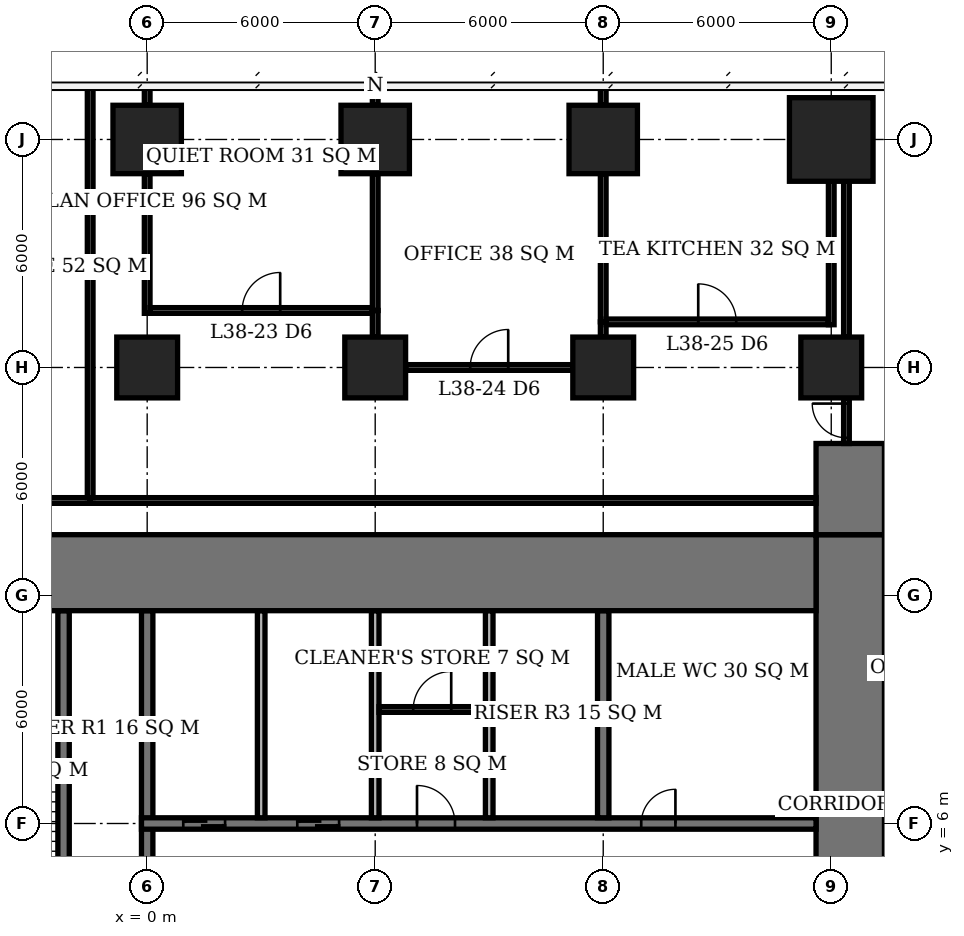
"""IFC4 building model, lengths in metres.
Left out: names, types, materials, properties, quantities, classifications, styles, units other than length and angle.
Written with IfcOpenShell. Run it as: python <this file> out.ifc"""

import sys

from ifc_helpers import new_model, si_unit, direction, frame, frame_2d, origin, origin_2d, place, context, subcontext, project, spatial, rectangle, extrude, element, fill, save


model = new_model("IFC4")
c1 = context("Model", 3, precision=1e-05, world=origin(), true_north=direction((0.0, 1.0)))
c2 = subcontext(c1, "Body", "Model", "MODEL_VIEW")
j1 = project(units=[si_unit("LENGTHUNIT", "METRE"), si_unit("PLANEANGLEUNIT", "RADIAN")], contexts=[c1])
p1 = place(None, origin())
s1 = spatial("IfcSite", under=j1, at=p1, CompositionType="ELEMENT")
p2 = place(p1, origin())
s2 = spatial("IfcBuilding", under=s1, at=p2, CompositionType="ELEMENT")
p3 = place(p2, frame((0.0, 0.0, 156.2)))
s3 = spatial("IfcBuildingStorey", under=s2, at=p3, CompositionType="ELEMENT", Elevation=156.2)
p4 = place(p3, frame((0.0, 18.0, 0.0), z_axis=(0.0, 0.0, 1.0), x_axis=(1.0, 0.0, 0.0)))
e1 = element("IfcColumn", 1, at=p4, inside=s3, PredefinedType="COLUMN", context=c2, shape_type="SweptSolid", body=[
    extrude(rectangle(XDim=1.6, YDim=1.6, at=origin_2d()), origin(), (0.0, 0.0, 1.0), 3.9),
])
p5 = place(p3, frame((0.0, 24.0, 0.0), z_axis=(0.0, 0.0, 1.0), x_axis=(1.0, 0.0, 0.0)))
e2 = element("IfcColumn", 2, at=p5, inside=s3, PredefinedType="COLUMN", context=c2, shape_type="SweptSolid", body=[
    extrude(rectangle(XDim=1.8, YDim=1.8, at=origin_2d()), origin(), (0.0, 0.0, 1.0), 3.9),
])
p6 = place(p3, frame((6.0, 18.0, 0.0), z_axis=(0.0, 0.0, 1.0), x_axis=(1.0, 0.0, 0.0)))
e3 = element("IfcColumn", 3, at=p6, inside=s3, PredefinedType="COLUMN", context=c2, shape_type="SweptSolid", body=[
    extrude(rectangle(XDim=1.6, YDim=1.6, at=origin_2d()), origin(), (0.0, 0.0, 1.0), 3.9),
])
p7 = place(p3, frame((6.0, 24.0, 0.0), z_axis=(0.0, 0.0, 1.0), x_axis=(1.0, 0.0, 0.0)))
e4 = element("IfcColumn", 4, at=p7, inside=s3, PredefinedType="COLUMN", context=c2, shape_type="SweptSolid", body=[
    extrude(rectangle(XDim=1.8, YDim=1.8, at=origin_2d()), origin(), (0.0, 0.0, 1.0), 3.9),
])
p8 = place(p3, frame((12.0, 18.0, 0.0), z_axis=(0.0, 0.0, 1.0), x_axis=(1.0, 0.0, 0.0)))
e5 = element("IfcColumn", 5, at=p8, inside=s3, PredefinedType="COLUMN", context=c2, shape_type="SweptSolid", body=[
    extrude(rectangle(XDim=1.6, YDim=1.6, at=origin_2d()), origin(), (0.0, 0.0, 1.0), 3.9),
])
p9 = place(p3, frame((12.0, 24.0, 0.0), z_axis=(0.0, 0.0, 1.0), x_axis=(1.0, 0.0, 0.0)))
e6 = element("IfcColumn", 6, at=p9, inside=s3, PredefinedType="COLUMN", context=c2, shape_type="SweptSolid", body=[
    extrude(rectangle(XDim=1.8, YDim=1.8, at=origin_2d()), origin(), (0.0, 0.0, 1.0), 3.9),
])
p10 = place(p3, frame((18.0, 18.0, 0.0), z_axis=(0.0, 0.0, 1.0), x_axis=(1.0, 0.0, 0.0)))
e7 = element("IfcColumn", 7, at=p10, inside=s3, PredefinedType="COLUMN", context=c2, shape_type="SweptSolid", body=[
    extrude(rectangle(XDim=1.6, YDim=1.6, at=origin_2d()), origin(), (0.0, 0.0, 1.0), 3.9),
])
p11 = place(p3, frame((18.0, 24.0, 0.0), z_axis=(0.0, 0.0, 1.0), x_axis=(1.0, 0.0, 0.0)))
e8 = element("IfcColumn", 8, at=p11, inside=s3, PredefinedType="COLUMN", context=c2, shape_type="SweptSolid", body=[
    extrude(rectangle(XDim=2.2, YDim=2.2, at=origin_2d()), origin(), (0.0, 0.0, 1.0), 3.9),
])
p12 = place(p3, frame((-5.6, 12.6, 0.0), z_axis=(0.0, 0.0, 1.0), x_axis=(1.0, 0.0, 0.0)))
e9 = element("IfcWall", 9, at=p12, inside=s3, PredefinedType="SHEAR", context=c2, shape_type="SweptSolid", body=[
    extrude(rectangle(XDim=23.2, YDim=2.0, at=frame_2d((11.6, 0.0))), origin(), (0.0, 0.0, 1.0), 3.9),
])
p13 = place(p3, frame((18.5, -7.6, 0.0), z_axis=(0.0, 0.0, 1.0), x_axis=(0.0, 1.0, 0.0)))
e10 = element("IfcWall", 10, at=p13, inside=s3, PredefinedType="SHEAR", context=c2, shape_type="SweptSolid", body=[
    extrude(rectangle(XDim=21.2, YDim=1.8, at=frame_2d((10.6, 0.0))), origin(), (0.0, 0.0, 1.0), 3.9),
])
p14 = place(p13, frame((9.2, 0.0, 0.0)))
e11 = element("IfcOpeningElement", 11, at=p14, cuts=e10, PredefinedType="OPENING", context=c2, shape_type="SweptSolid", body=[
    extrude(rectangle(XDim=1.8, YDim=2.4, at=frame_2d((0.9, 1.2))), frame((0.0, 0.91, 0.0), z_axis=(0.0, -1.0, 0.0), x_axis=(1.0, 0.0, 0.0)), (0.0, 0.0, 1.0), 1.82),
])
p15 = place(p3, frame((18.5, 13.6, 0.0), z_axis=(0.0, 0.0, 1.0), x_axis=(0.0, 1.0, 0.0)))
e12 = element("IfcWall", 12, at=p15, inside=s3, PredefinedType="SHEAR", context=c2, shape_type="SweptSolid", body=[
    extrude(rectangle(XDim=2.4, YDim=1.8, at=frame_2d((1.2, 0.0))), origin(), (0.0, 0.0, 1.0), 3.9),
])
p16 = place(p3, frame((-0.15, 6.0, 0.0), z_axis=(0.0, 0.0, 1.0), x_axis=(1.0, 0.0, 0.0)))
e13 = element("IfcWall", 13, at=p16, inside=s3, PredefinedType="SHEAR", context=c2, shape_type="SweptSolid", body=[
    extrude(rectangle(XDim=17.75, YDim=0.3, at=frame_2d((8.875, 0.0))), origin(), (0.0, 0.0, 1.0), 3.9),
])
p17 = place(p16, frame((13.15, 0.0, 0.0)))
e14 = element("IfcOpeningElement", 14, at=p17, cuts=e13, PredefinedType="OPENING", context=c2, shape_type="SweptSolid", body=[
    extrude(rectangle(XDim=0.9, YDim=2.1, at=frame_2d((0.45, 1.05))), frame((0.0, 0.16, 0.0), z_axis=(0.0, -1.0, 0.0), x_axis=(1.0, 0.0, 0.0)), (0.0, 0.0, 1.0), 0.32),
])
p18 = place(p16, frame((7.25, 0.0, 0.0)))
e15 = element("IfcOpeningElement", 15, at=p18, cuts=e13, PredefinedType="OPENING", context=c2, shape_type="SweptSolid", body=[
    extrude(rectangle(XDim=1.0, YDim=2.1, at=frame_2d((0.5, 1.05))), frame((0.0, 0.16, 0.0), z_axis=(0.0, -1.0, 0.0), x_axis=(1.0, 0.0, 0.0)), (0.0, 0.0, 1.0), 0.32),
])
p19 = place(p16, frame((1.1, 0.0, 0.0)))
e16 = element("IfcOpeningElement", 16, at=p19, cuts=e13, PredefinedType="OPENING", context=c2, shape_type="SweptSolid", body=[
    extrude(rectangle(XDim=1.1, YDim=2.1, at=frame_2d((0.55, 1.05))), frame((0.0, 0.16, 0.0), z_axis=(0.0, -1.0, 0.0), x_axis=(1.0, 0.0, 0.0)), (0.0, 0.0, 1.0), 0.32),
])
p20 = place(p16, frame((4.1, 0.0, 0.0)))
e17 = element("IfcOpeningElement", 17, at=p20, cuts=e13, PredefinedType="OPENING", context=c2, shape_type="SweptSolid", body=[
    extrude(rectangle(XDim=1.1, YDim=2.1, at=frame_2d((0.55, 1.05))), frame((0.0, 0.16, 0.0), z_axis=(0.0, -1.0, 0.0), x_axis=(1.0, 0.0, 0.0)), (0.0, 0.0, 1.0), 0.32),
])
p21 = place(p3, frame((0.0, 3.15, 0.0), z_axis=(0.0, 0.0, 1.0), x_axis=(0.0, 1.0, 0.0)))
e18 = element("IfcWall", 18, at=p21, inside=s3, PredefinedType="SHEAR", context=c2, shape_type="SweptSolid", body=[
    extrude(rectangle(XDim=8.45, YDim=0.3, at=frame_2d((4.225, 0.0))), origin(), (0.0, 0.0, 1.0), 3.9),
])
p22 = place(p3, frame((12.0, 6.15, 0.0), z_axis=(0.0, 0.0, 1.0), x_axis=(0.0, 1.0, 0.0)))
e19 = element("IfcWall", 19, at=p22, inside=s3, PredefinedType="SHEAR", context=c2, shape_type="SweptSolid", body=[
    extrude(rectangle(XDim=5.45, YDim=0.3, at=frame_2d((2.725, 0.0))), origin(), (0.0, 0.0, 1.0), 3.9),
])
p23 = place(p3, frame((-2.2, 3.15, 0.0), z_axis=(0.0, 0.0, 1.0), x_axis=(0.0, 1.0, 0.0)))
e20 = element("IfcWall", 20, at=p23, inside=s3, PredefinedType="SHEAR", context=c2, shape_type="SweptSolid", body=[
    extrude(rectangle(XDim=8.45, YDim=0.3, at=frame_2d((4.225, 0.0))), origin(), (0.0, 0.0, 1.0), 3.9),
])
for number, where, z_axis, x_axis in (
    (21, (3.0, 6.15, 0.0), (0.0, 0.0, 1.0), (0.0, 1.0, 0.0)),
    (22, (6.0, 6.15, 0.0), (0.0, 0.0, 1.0), (0.0, 1.0, 0.0)),
    (23, (9.0, 6.15, 0.0), (0.0, 0.0, 1.0), (0.0, 1.0, 0.0)),
):
    element("IfcWall", number, at=place(p3, frame(where, z_axis=z_axis, x_axis=x_axis)), inside=s3, PredefinedType="SOLIDWALL", context=c2, shape_type="SweptSolid", body=[
        extrude(rectangle(XDim=5.45, YDim=0.2, at=frame_2d((2.725, 0.0))), origin(), (0.0, 0.0, 1.0), 3.9),
    ])
p24 = place(p3, frame((6.1, 9.0, 0.0), z_axis=(0.0, 0.0, 1.0), x_axis=(1.0, 0.0, 0.0)))
e24 = element("IfcWall", 24, at=p24, inside=s3, PredefinedType="PARTITIONING", context=c2, shape_type="SweptSolid", body=[
    extrude(rectangle(XDim=2.8, YDim=0.15, at=frame_2d((1.4, 0.0))), origin(), (0.0, 0.0, 1.0), 3.65),
])
p25 = place(p24, frame((0.9, 0.0, 0.0)))
e25 = element("IfcOpeningElement", 25, at=p25, cuts=e24, PredefinedType="OPENING", context=c2, shape_type="SweptSolid", body=[
    extrude(rectangle(XDim=1.0, YDim=2.1, at=frame_2d((0.5, 1.05))), frame((0.0, 0.085, 0.0), z_axis=(0.0, -1.0, 0.0), x_axis=(1.0, 0.0, 0.0)), (0.0, 0.0, 1.0), 0.17),
])
p26 = place(p3, frame((6.8, 18.0, 0.0), z_axis=(0.0, 0.0, 1.0), x_axis=(1.0, 0.0, 0.0)))
e26 = element("IfcWall", 26, at=p26, inside=s3, PredefinedType="PARTITIONING", context=c2, shape_type="SweptSolid", body=[
    extrude(rectangle(XDim=4.4, YDim=0.15, at=frame_2d((2.2, 0.0))), origin(), (0.0, 0.0, 1.0), 3.65),
])
p27 = place(p26, frame((1.7, 0.0, 0.0)))
e27 = element("IfcOpeningElement", 27, at=p27, cuts=e26, PredefinedType="OPENING", context=c2, shape_type="SweptSolid", body=[
    extrude(rectangle(XDim=1.0, YDim=2.1, at=frame_2d((0.5, 1.05))), frame((0.0, 0.085, 0.0), z_axis=(0.0, -1.0, 0.0), x_axis=(1.0, 0.0, 0.0)), (0.0, 0.0, 1.0), 0.17),
])
p28 = place(p3, frame((12.075, 19.2, 0.0), z_axis=(0.0, 0.0, 1.0), x_axis=(1.0, 0.0, 0.0)))
e28 = element("IfcWall", 28, at=p28, inside=s3, PredefinedType="PARTITIONING", context=c2, shape_type="SweptSolid", body=[
    extrude(rectangle(XDim=5.85, YDim=0.15, at=frame_2d((2.925, 0.0))), origin(), (0.0, 0.0, 1.0), 3.65),
])
p29 = place(p28, frame((2.425, 0.0, 0.0)))
e29 = element("IfcOpeningElement", 29, at=p29, cuts=e28, PredefinedType="OPENING", context=c2, shape_type="SweptSolid", body=[
    extrude(rectangle(XDim=1.0, YDim=2.1, at=frame_2d((0.5, 1.05))), frame((0.0, 0.085, 0.0), z_axis=(0.0, -1.0, 0.0), x_axis=(1.0, 0.0, 0.0)), (0.0, 0.0, 1.0), 0.17),
])
p30 = place(p3, frame((0.075, 19.5, 0.0), z_axis=(0.0, 0.0, 1.0), x_axis=(1.0, 0.0, 0.0)))
e30 = element("IfcWall", 30, at=p30, inside=s3, PredefinedType="PARTITIONING", context=c2, shape_type="SweptSolid", body=[
    extrude(rectangle(XDim=5.85, YDim=0.15, at=frame_2d((2.925, 0.0))), origin(), (0.0, 0.0, 1.0), 3.65),
])
p31 = place(p30, frame((2.425, 0.0, 0.0)))
e31 = element("IfcOpeningElement", 31, at=p31, cuts=e30, PredefinedType="OPENING", context=c2, shape_type="SweptSolid", body=[
    extrude(rectangle(XDim=1.0, YDim=2.1, at=frame_2d((0.5, 1.05))), frame((0.0, 0.085, 0.0), z_axis=(0.0, -1.0, 0.0), x_axis=(1.0, 0.0, 0.0)), (0.0, 0.0, 1.0), 0.17),
])
p32 = place(p3, frame((0.0, 19.425, 0.0), z_axis=(0.0, 0.0, 1.0), x_axis=(0.0, 1.0, 0.0)))
e32 = element("IfcWall", 32, at=p32, inside=s3, PredefinedType="PARTITIONING", context=c2, shape_type="SweptSolid", body=[
    extrude(rectangle(XDim=3.675, YDim=0.15, at=frame_2d((1.837, 0.0))), origin(), (0.0, 0.0, 1.0), 3.65),
])
p33 = place(p3, frame((0.0, 24.9, 0.0), z_axis=(0.0, 0.0, 1.0), x_axis=(0.0, 1.0, 0.0)))
e33 = element("IfcWall", 33, at=p33, inside=s3, PredefinedType="PARTITIONING", context=c2, shape_type="SweptSolid", body=[
    extrude(rectangle(XDim=0.5, YDim=0.15, at=frame_2d((0.25, 0.0))), origin(), (0.0, 0.0, 1.0), 3.65),
])
p34 = place(p3, frame((6.0, 18.8, 0.0), z_axis=(0.0, 0.0, 1.0), x_axis=(0.0, 1.0, 0.0)))
e34 = element("IfcWall", 34, at=p34, inside=s3, PredefinedType="PARTITIONING", context=c2, shape_type="SweptSolid", body=[
    extrude(rectangle(XDim=0.7, YDim=0.15, at=frame_2d((0.35, 0.0))), origin(), (0.0, 0.0, 1.0), 3.65),
])
p35 = place(p3, frame((6.0, 19.5, 0.0), z_axis=(0.0, 0.0, 1.0), x_axis=(0.0, 1.0, 0.0)))
e35 = element("IfcWall", 35, at=p35, inside=s3, PredefinedType="PARTITIONING", context=c2, shape_type="SweptSolid", body=[
    extrude(rectangle(XDim=3.6, YDim=0.15, at=frame_2d((1.8, 0.0))), origin(), (0.0, 0.0, 1.0), 3.65),
])
p36 = place(p3, frame((6.0, 24.9, 0.0), z_axis=(0.0, 0.0, 1.0), x_axis=(0.0, 1.0, 0.0)))
e36 = element("IfcWall", 36, at=p36, inside=s3, PredefinedType="PARTITIONING", context=c2, shape_type="SweptSolid", body=[
    extrude(rectangle(XDim=0.45, YDim=0.15, at=frame_2d((0.225, 0.0))), origin(), (0.0, 0.0, 1.0), 3.65),
])
p37 = place(p3, frame((12.0, 18.8, 0.0), z_axis=(0.0, 0.0, 1.0), x_axis=(0.0, 1.0, 0.0)))
e37 = element("IfcWall", 37, at=p37, inside=s3, PredefinedType="PARTITIONING", context=c2, shape_type="SweptSolid", body=[
    extrude(rectangle(XDim=0.4, YDim=0.15, at=frame_2d((0.2, 0.0))), origin(), (0.0, 0.0, 1.0), 3.65),
])
p38 = place(p3, frame((12.0, 19.2, 0.0), z_axis=(0.0, 0.0, 1.0), x_axis=(0.0, 1.0, 0.0)))
e38 = element("IfcWall", 38, at=p38, inside=s3, PredefinedType="PARTITIONING", context=c2, shape_type="SweptSolid", body=[
    extrude(rectangle(XDim=3.9, YDim=0.15, at=frame_2d((1.95, 0.0))), origin(), (0.0, 0.0, 1.0), 3.65),
])
p39 = place(p3, frame((12.0, 24.9, 0.0), z_axis=(0.0, 0.0, 1.0), x_axis=(0.0, 1.0, 0.0)))
e39 = element("IfcWall", 39, at=p39, inside=s3, PredefinedType="PARTITIONING", context=c2, shape_type="SweptSolid", body=[
    extrude(rectangle(XDim=0.5, YDim=0.15, at=frame_2d((0.25, 0.0))), origin(), (0.0, 0.0, 1.0), 3.65),
])
p40 = place(p3, frame((18.0, 19.125, 0.0), z_axis=(0.0, 0.0, 1.0), x_axis=(0.0, 1.0, 0.0)))
e40 = element("IfcWall", 40, at=p40, inside=s3, PredefinedType="PARTITIONING", context=c2, shape_type="SweptSolid", body=[
    extrude(rectangle(XDim=3.775, YDim=0.15, at=frame_2d((1.887, 0.0))), origin(), (0.0, 0.0, 1.0), 3.65),
])
p41 = place(p3, frame((-5.6, 14.5, 0.0), z_axis=(0.0, 0.0, 1.0), x_axis=(1.0, 0.0, 0.0)))
e41 = element("IfcWall", 41, at=p41, inside=s3, PredefinedType="PARTITIONING", context=c2, shape_type="SweptSolid", body=[
    extrude(rectangle(XDim=4.1, YDim=0.15, at=frame_2d((2.05, 0.0))), origin(), (0.0, 0.0, 1.0), 3.65),
])
p42 = place(p3, frame((-1.5, 14.575, 0.0), z_axis=(0.0, 0.0, 1.0), x_axis=(0.0, 1.0, 0.0)))
e42 = element("IfcWall", 42, at=p42, inside=s3, PredefinedType="PARTITIONING", context=c2, shape_type="SweptSolid", body=[
    extrude(rectangle(XDim=10.825, YDim=0.15, at=frame_2d((5.413, 0.0))), origin(), (0.0, 0.0, 1.0), 3.65),
])
p43 = place(p3, frame((-1.5, 14.5, 0.0), z_axis=(0.0, 0.0, 1.0), x_axis=(1.0, 0.0, 0.0)))
e43 = element("IfcWall", 43, at=p43, inside=s3, PredefinedType="PARTITIONING", context=c2, shape_type="SweptSolid", body=[
    extrude(rectangle(XDim=19.1, YDim=0.15, at=frame_2d((9.55, 0.0))), origin(), (0.0, 0.0, 1.0), 3.65),
])
p44 = place(p3, frame((18.4, 16.0, 0.0), z_axis=(0.0, 0.0, 1.0), x_axis=(0.0, 1.0, 0.0)))
e44 = element("IfcWall", 44, at=p44, inside=s3, PredefinedType="PARTITIONING", context=c2, shape_type="SweptSolid", body=[
    extrude(rectangle(XDim=1.2, YDim=0.15, at=frame_2d((0.6, 0.0))), origin(), (0.0, 0.0, 1.0), 3.65),
])
p45 = place(p44, frame((0.15, 0.0, 0.0)))
e45 = element("IfcOpeningElement", 45, at=p45, cuts=e44, PredefinedType="OPENING", context=c2, shape_type="SweptSolid", body=[
    extrude(rectangle(XDim=0.9, YDim=2.1, at=frame_2d((0.45, 1.05))), frame((0.0, 0.085, 0.0), z_axis=(0.0, -1.0, 0.0), x_axis=(1.0, 0.0, 0.0)), (0.0, 0.0, 1.0), 0.17),
])
p46 = place(p3, frame((18.4, 18.8, 0.0), z_axis=(0.0, 0.0, 1.0), x_axis=(0.0, 1.0, 0.0)))
e46 = element("IfcWall", 46, at=p46, inside=s3, PredefinedType="PARTITIONING", context=c2, shape_type="SweptSolid", body=[
    extrude(rectangle(XDim=4.1, YDim=0.15, at=frame_2d((2.05, 0.0))), origin(), (0.0, 0.0, 1.0), 3.65),
])
p47 = place(p17, origin())
e47 = element("IfcDoor", 47, at=p47, inside=s3, OperationType="SINGLE_SWING_RIGHT", PredefinedType="DOOR", context=c2, shape_type="SweptSolid", body=[
    extrude(rectangle(XDim=0.9, YDim=2.1, at=frame_2d((0.45, 1.05))), frame((0.0, 0.025, 0.0), z_axis=(0.0, -1.0, 0.0), x_axis=(1.0, 0.0, 0.0)), (0.0, 0.0, 1.0), 0.05),
])
fill(e14, e47)
p48 = place(p25, origin())
e48 = element("IfcDoor", 48, at=p48, inside=s3, OperationType="SINGLE_SWING_RIGHT", PredefinedType="DOOR", context=c2, shape_type="SweptSolid", body=[
    extrude(rectangle(XDim=1.0, YDim=2.1, at=frame_2d((0.5, 1.05))), frame((0.0, 0.025, 0.0), z_axis=(0.0, -1.0, 0.0), x_axis=(1.0, 0.0, 0.0)), (0.0, 0.0, 1.0), 0.05),
])
fill(e25, e48)
p49 = place(p18, origin())
e49 = element("IfcDoor", 49, at=p49, inside=s3, OperationType="SINGLE_SWING_LEFT", PredefinedType="DOOR", context=c2, shape_type="SweptSolid", body=[
    extrude(rectangle(XDim=1.0, YDim=2.1, at=frame_2d((0.5, 1.05))), frame((0.0, 0.025, 0.0), z_axis=(0.0, -1.0, 0.0), x_axis=(1.0, 0.0, 0.0)), (0.0, 0.0, 1.0), 0.05),
])
fill(e15, e49)
p50 = place(p19, origin())
e50 = element("IfcDoor", 50, at=p50, inside=s3, OperationType="DOUBLE_DOOR_SLIDING", PredefinedType="USERDEFINED", context=c2, shape_type="SweptSolid", body=[
    extrude(rectangle(XDim=1.1, YDim=2.1, at=frame_2d((0.55, 1.05))), frame((0.0, 0.025, 0.0), z_axis=(0.0, -1.0, 0.0), x_axis=(1.0, 0.0, 0.0)), (0.0, 0.0, 1.0), 0.05),
])
fill(e16, e50)
p51 = place(p20, origin())
e51 = element("IfcDoor", 51, at=p51, inside=s3, OperationType="DOUBLE_DOOR_SLIDING", PredefinedType="USERDEFINED", context=c2, shape_type="SweptSolid", body=[
    extrude(rectangle(XDim=1.1, YDim=2.1, at=frame_2d((0.55, 1.05))), frame((0.0, 0.025, 0.0), z_axis=(0.0, -1.0, 0.0), x_axis=(1.0, 0.0, 0.0)), (0.0, 0.0, 1.0), 0.05),
])
fill(e17, e51)
p52 = place(p31, origin())
e52 = element("IfcDoor", 52, at=p52, inside=s3, OperationType="SINGLE_SWING_RIGHT", PredefinedType="DOOR", context=c2, shape_type="SweptSolid", body=[
    extrude(rectangle(XDim=1.0, YDim=2.1, at=frame_2d((0.5, 1.05))), frame((0.0, 0.025, 0.0), z_axis=(0.0, -1.0, 0.0), x_axis=(1.0, 0.0, 0.0)), (0.0, 0.0, 1.0), 0.05),
])
fill(e31, e52)
p53 = place(p27, origin())
e53 = element("IfcDoor", 53, at=p53, inside=s3, OperationType="SINGLE_SWING_RIGHT", PredefinedType="DOOR", context=c2, shape_type="SweptSolid", body=[
    extrude(rectangle(XDim=1.0, YDim=2.1, at=frame_2d((0.5, 1.05))), frame((0.0, 0.025, 0.0), z_axis=(0.0, -1.0, 0.0), x_axis=(1.0, 0.0, 0.0)), (0.0, 0.0, 1.0), 0.05),
])
fill(e27, e53)
p54 = place(p29, origin())
e54 = element("IfcDoor", 54, at=p54, inside=s3, OperationType="SINGLE_SWING_LEFT", PredefinedType="DOOR", context=c2, shape_type="SweptSolid", body=[
    extrude(rectangle(XDim=1.0, YDim=2.1, at=frame_2d((0.5, 1.05))), frame((0.0, 0.025, 0.0), z_axis=(0.0, -1.0, 0.0), x_axis=(1.0, 0.0, 0.0)), (0.0, 0.0, 1.0), 0.05),
])
fill(e29, e54)
p55 = place(p45, origin())
e55 = element("IfcDoor", 55, at=p55, inside=s3, OperationType="SINGLE_SWING_RIGHT", PredefinedType="DOOR", context=c2, shape_type="SweptSolid", body=[
    extrude(rectangle(XDim=0.9, YDim=2.1, at=frame_2d((0.45, 1.05))), frame((0.0, 0.025, 0.0), z_axis=(0.0, -1.0, 0.0), x_axis=(1.0, 0.0, 0.0)), (0.0, 0.0, 1.0), 0.05),
])
fill(e45, e55)
save(model, sys.argv[1])
